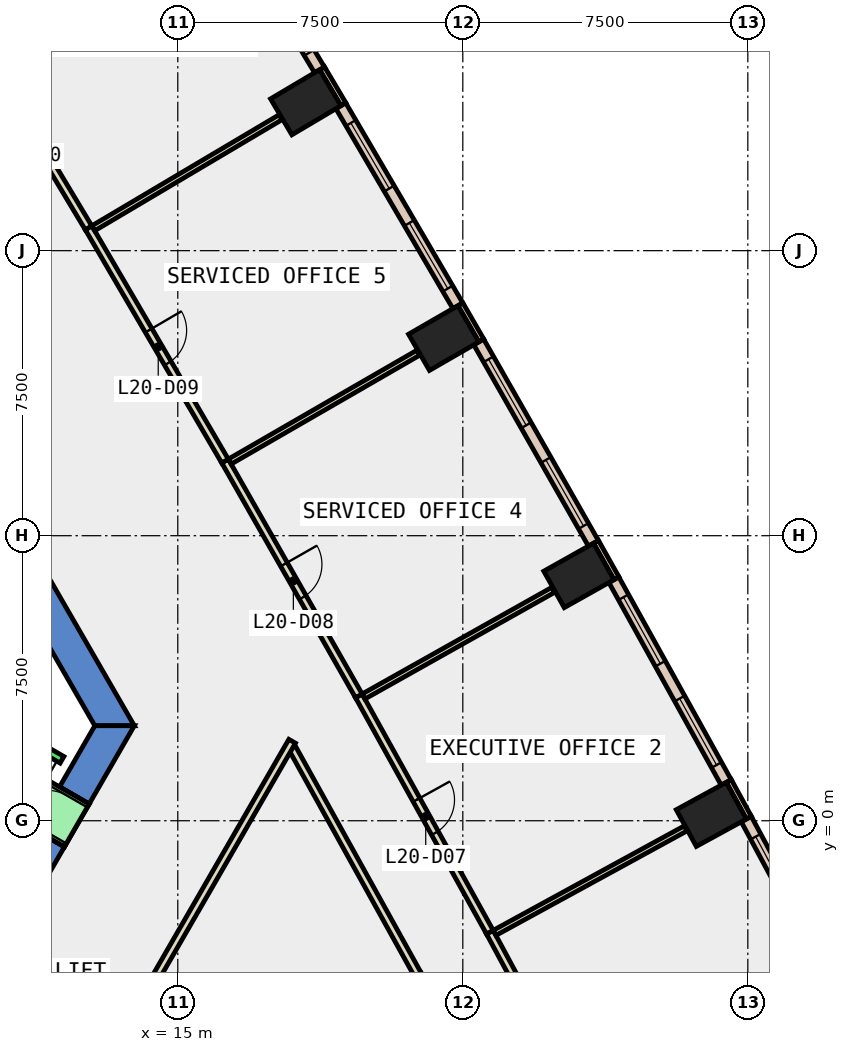
"""IFC4 building model, lengths in metres.
Left out: names, types, materials, properties, quantities, classifications, styles, units other than length and angle.
Written with IfcOpenShell. Run it as: python <this file> out.ifc"""

import sys

from ifc_helpers import new_model, si_unit, direction, frame, frame_2d, origin, origin_2d, place, context, subcontext, project, spatial, polyline, rectangle, outline, extrude, element, fill, save


model = new_model("IFC4")
c1 = context("Model", 3, precision=1e-05, world=origin(), true_north=direction((0.0, 1.0)))
c2 = subcontext(c1, "Body", "Model", "MODEL_VIEW")
j1 = project(units=[si_unit("LENGTHUNIT", "METRE"), si_unit("PLANEANGLEUNIT", "RADIAN")], contexts=[c1])
p1 = place(None, origin())
s1 = spatial("IfcSite", under=j1, at=p1, CompositionType="ELEMENT")
p2 = place(p1, origin())
s2 = spatial("IfcBuilding", under=s1, at=p2, CompositionType="ELEMENT")
p3 = place(p2, frame((0.0, 0.0, 95.0)))
s3 = spatial("IfcBuildingStorey", under=s2, at=p3, CompositionType="ELEMENT", Elevation=95.0)
for number, where, z_axis, x_axis in (
    (1, (29.039, 0.167, -0.4), (0.0, 0.0, 1.0), (-0.48, 0.877, 0.0)),
    (2, (25.554, 6.454, -0.4), (0.0, 0.0, 1.0), (-0.49, 0.872, 0.0)),
    (3, (21.997, 12.7, -0.4), (0.0, 0.0, 1.0), (-0.5, 0.866, 0.0)),
    (4, (18.367, 18.904, -0.4), (0.0, 0.0, 1.0), (-0.51, 0.86, 0.0)),
):
    element("IfcColumn", number, at=place(p3, frame(where, z_axis=z_axis, x_axis=x_axis)), inside=s3, PredefinedType="COLUMN", context=c2, shape_type="SweptSolid", body=[
        extrude(rectangle(XDim=1.1, YDim=1.5, at=origin_2d()), origin(), (0.0, 0.0, 1.0), 4.2),
    ])
p4 = place(p3, frame((0.0, 0.0, -0.4)))
e5 = element("IfcWall", 5, at=p4, inside=s3, PredefinedType="SHEAR", context=c2, shape_type="SweptSolid", body=[
    extrude(outline(polyline([(8.517, 11.748), (7.738, 11.298), (12.817, 2.5), (13.856, 2.5), (8.517, 11.748)])), origin(), (0.0, 0.0, 1.0), 4.2),
])
p5 = place(p3, frame((0.0, 0.0, -0.4)))
e6 = element("IfcWall", 6, at=p5, inside=s3, PredefinedType="SHEAR", context=c2, shape_type="SweptSolid", body=[
    extrude(outline(polyline([(12.017, -0.686), (11.238, -0.236), (10.588, -1.361), (11.367, -1.811), (12.017, -0.686)])), origin(), (0.0, 0.0, 1.0), 4.2),
])
p6 = place(p3, frame((0.0, 0.0, -0.4)))
e7 = element("IfcWall", 7, at=p6, inside=s3, PredefinedType="SHEAR", context=c2, shape_type="SweptSolid", body=[
    extrude(outline(polyline([(11.888, 0.89), (12.667, 0.44), (13.856, 2.5), (12.817, 2.5), (11.888, 0.89)])), origin(), (0.0, 0.0, 1.0), 4.2),
])
p7 = place(p3, frame((0.0, 0.0, 3.6)))
e8 = element("IfcWall", 8, at=p7, inside=s3, PredefinedType="SHEAR", context=c2, shape_type="SweptSolid", body=[
    extrude(outline(polyline([(12.667, 0.44), (11.888, 0.89), (11.238, -0.236), (12.017, -0.686), (12.667, 0.44)])), origin(), (0.0, 0.0, 1.0), 0.2),
])
p8 = place(p3, frame((30.027, 0.08, 0.0), z_axis=(0.0, 0.0, 1.0), x_axis=(-0.479737645119, 0.877411985247, 0.0)))
e9 = element("IfcWall", 9, at=p8, inside=s3, PredefinedType="STANDARD", context=c2, shape_type="SweptSolid", body=[
    extrude(rectangle(XDim=1.101, YDim=0.15, at=frame_2d((0.55, 0.0))), origin(), (0.0, 0.0, 1.0), 3.8),
])
p9 = place(p3, frame((26.543, 6.379, 0.0), z_axis=(0.0, 0.0, 1.0), x_axis=(-0.490008344094, 0.871717742574, 0.0)))
e10 = element("IfcWall", 10, at=p9, inside=s3, PredefinedType="STANDARD", context=c2, shape_type="SweptSolid", body=[
    extrude(rectangle(XDim=1.1, YDim=0.15, at=frame_2d((0.55, 0.0))), origin(), (0.0, 0.0, 1.0), 3.8),
])
p10 = place(p3, frame((22.986, 12.636, 0.0), z_axis=(0.0, 0.0, 1.0), x_axis=(-0.499837685251, 0.86611909597, 0.0)))
e11 = element("IfcWall", 11, at=p10, inside=s3, PredefinedType="STANDARD", context=c2, shape_type="SweptSolid", body=[
    extrude(rectangle(XDim=1.1, YDim=0.15, at=frame_2d((0.55, 0.0))), origin(), (0.0, 0.0, 1.0), 3.8),
])
p11 = place(p3, frame((19.357, 18.852, 0.0), z_axis=(0.0, 0.0, 1.0), x_axis=(-0.510082245696, 0.860125631885, 0.0)))
e12 = element("IfcWall", 12, at=p11, inside=s3, PredefinedType="STANDARD", context=c2, shape_type="SweptSolid", body=[
    extrude(rectangle(XDim=1.1, YDim=0.15, at=frame_2d((0.55, 0.0))), origin(), (0.0, 0.0, 1.0), 3.8),
])
p12 = place(p3, frame((32.851, -5.325, 0.0), z_axis=(0.0, 0.0, 1.0), x_axis=(-0.474369552216, 0.880325807829, 0.0)))
e13 = element("IfcWall", 13, at=p12, inside=s3, PredefinedType="STANDARD", context=c2, shape_type="SweptSolid", body=[
    extrude(rectangle(XDim=6.099, YDim=0.3, at=frame_2d((3.049, 0.0))), origin(), (0.0, 0.0, 1.0), 3.8),
])
p13 = place(p12, frame((0.525, 0.0, 0.9)))
e14 = element("IfcOpeningElement", 14, at=p13, cuts=e13, PredefinedType="OPENING", context=c2, shape_type="SweptSolid", body=[
    extrude(rectangle(XDim=2.0, YDim=2.6, at=frame_2d((1.0, 1.3))), frame((0.0, 0.16, 0.0), z_axis=(0.0, -1.0, 0.0), x_axis=(1.0, 0.0, 0.0)), (0.0, 0.0, 1.0), 0.32),
])
p14 = place(p12, frame((3.574, 0.0, 0.9)))
e15 = element("IfcOpeningElement", 15, at=p14, cuts=e13, PredefinedType="OPENING", context=c2, shape_type="SweptSolid", body=[
    extrude(rectangle(XDim=2.0, YDim=2.6, at=frame_2d((1.0, 1.3))), frame((0.0, 0.16, 0.0), z_axis=(0.0, -1.0, 0.0), x_axis=(1.0, 0.0, 0.0)), (0.0, 0.0, 1.0), 0.32),
])
p15 = place(p3, frame((29.431, 1.007, 0.0), z_axis=(0.0, 0.0, 1.0), x_axis=(-0.484823579315, 0.874611969356, 0.0)))
e16 = element("IfcWall", 16, at=p15, inside=s3, PredefinedType="STANDARD", context=c2, shape_type="SweptSolid", body=[
    extrude(rectangle(XDim=6.099, YDim=0.3, at=frame_2d((3.049, 0.0))), origin(), (0.0, 0.0, 1.0), 3.8),
])
p16 = place(p15, frame((0.525, 0.0, 0.9)))
e17 = element("IfcOpeningElement", 17, at=p16, cuts=e16, PredefinedType="OPENING", context=c2, shape_type="SweptSolid", body=[
    extrude(rectangle(XDim=2.0, YDim=2.6, at=frame_2d((1.0, 1.3))), frame((0.0, 0.16, 0.0), z_axis=(0.0, -1.0, 0.0), x_axis=(1.0, 0.0, 0.0)), (0.0, 0.0, 1.0), 0.32),
])
p17 = place(p15, frame((3.574, 0.0, 0.9)))
e18 = element("IfcOpeningElement", 18, at=p17, cuts=e16, PredefinedType="OPENING", context=c2, shape_type="SweptSolid", body=[
    extrude(rectangle(XDim=2.0, YDim=2.6, at=frame_2d((1.0, 1.3))), frame((0.0, 0.16, 0.0), z_axis=(0.0, -1.0, 0.0), x_axis=(1.0, 0.0, 0.0)), (0.0, 0.0, 1.0), 0.32),
])
p18 = place(p3, frame((25.936, 7.299, 0.0), z_axis=(0.0, 0.0, 1.0), x_axis=(-0.49492259535, 0.868937065967, 0.0)))
e19 = element("IfcWall", 19, at=p18, inside=s3, PredefinedType="STANDARD", context=c2, shape_type="SweptSolid", body=[
    extrude(rectangle(XDim=6.098, YDim=0.3, at=frame_2d((3.049, 0.0))), origin(), (0.0, 0.0, 1.0), 3.8),
])
p19 = place(p18, frame((0.525, 0.0, 0.9)))
e20 = element("IfcOpeningElement", 20, at=p19, cuts=e19, PredefinedType="OPENING", context=c2, shape_type="SweptSolid", body=[
    extrude(rectangle(XDim=2.0, YDim=2.6, at=frame_2d((1.0, 1.3))), frame((0.0, 0.16, 0.0), z_axis=(0.0, -1.0, 0.0), x_axis=(1.0, 0.0, 0.0)), (0.0, 0.0, 1.0), 0.32),
])
p20 = place(p18, frame((3.574, 0.0, 0.9)))
e21 = element("IfcOpeningElement", 21, at=p20, cuts=e19, PredefinedType="OPENING", context=c2, shape_type="SweptSolid", body=[
    extrude(rectangle(XDim=2.0, YDim=2.6, at=frame_2d((1.0, 1.3))), frame((0.0, 0.16, 0.0), z_axis=(0.0, -1.0, 0.0), x_axis=(1.0, 0.0, 0.0)), (0.0, 0.0, 1.0), 0.32),
])
p21 = place(p3, frame((22.369, 13.549, 0.0), z_axis=(0.0, 0.0, 1.0), x_axis=(-0.504998117261, 0.863120444413, 0.0)))
e22 = element("IfcWall", 22, at=p21, inside=s3, PredefinedType="STANDARD", context=c2, shape_type="SweptSolid", body=[
    extrude(rectangle(XDim=6.099, YDim=0.3, at=frame_2d((3.049, 0.0))), origin(), (0.0, 0.0, 1.0), 3.8),
])
p22 = place(p21, frame((0.525, 0.0, 0.9)))
e23 = element("IfcOpeningElement", 23, at=p22, cuts=e22, PredefinedType="OPENING", context=c2, shape_type="SweptSolid", body=[
    extrude(rectangle(XDim=2.0, YDim=2.6, at=frame_2d((1.0, 1.3))), frame((0.0, 0.16, 0.0), z_axis=(0.0, -1.0, 0.0), x_axis=(1.0, 0.0, 0.0)), (0.0, 0.0, 1.0), 0.32),
])
p23 = place(p21, frame((3.574, 0.0, 0.9)))
e24 = element("IfcOpeningElement", 24, at=p23, cuts=e22, PredefinedType="OPENING", context=c2, shape_type="SweptSolid", body=[
    extrude(rectangle(XDim=2.0, YDim=2.6, at=frame_2d((1.0, 1.3))), frame((0.0, 0.16, 0.0), z_axis=(0.0, -1.0, 0.0), x_axis=(1.0, 0.0, 0.0)), (0.0, 0.0, 1.0), 0.32),
])
p24 = place(p3, frame((18.729, 19.757, 0.0), z_axis=(0.0, 0.0, 1.0), x_axis=(-0.515102053092, 0.857128855483, 0.0)))
e25 = element("IfcWall", 25, at=p24, inside=s3, PredefinedType="STANDARD", context=c2, shape_type="SweptSolid", body=[
    extrude(rectangle(XDim=6.098, YDim=0.3, at=frame_2d((3.049, 0.0))), origin(), (0.0, 0.0, 1.0), 3.8),
])
p25 = place(p24, frame((0.525, 0.0, 0.9)))
e26 = element("IfcOpeningElement", 26, at=p25, cuts=e25, PredefinedType="OPENING", context=c2, shape_type="SweptSolid", body=[
    extrude(rectangle(XDim=2.0, YDim=2.6, at=frame_2d((1.0, 1.3))), frame((0.0, 0.16, 0.0), z_axis=(0.0, -1.0, 0.0), x_axis=(1.0, 0.0, 0.0)), (0.0, 0.0, 1.0), 0.32),
])
p26 = place(p24, frame((3.574, 0.0, 0.9)))
e27 = element("IfcOpeningElement", 27, at=p26, cuts=e25, PredefinedType="OPENING", context=c2, shape_type="SweptSolid", body=[
    extrude(rectangle(XDim=2.0, YDim=2.6, at=frame_2d((1.0, 1.3))), frame((0.0, 0.16, 0.0), z_axis=(0.0, -1.0, 0.0), x_axis=(1.0, 0.0, 0.0)), (0.0, 0.0, 1.0), 0.32),
])
p27 = place(p3, frame((21.317, -4.053, 0.0), z_axis=(0.0, 0.0, 1.0), x_axis=(-0.484816829319, 0.874615711046, 0.0)))
e28 = element("IfcWall", 28, at=p27, inside=s3, PredefinedType="PARTITIONING", context=c2, shape_type="SweptSolid", body=[
    extrude(rectangle(XDim=6.827, YDim=0.2, at=frame_2d((3.414, 0.0))), origin(), (0.0, 0.0, 1.0), 3.8),
])
p28 = place(p3, frame((23.212, -2.932, 0.0), z_axis=(0.0, 0.0, 1.0), x_axis=(0.474404892994, -0.880306763295, 0.0)))
e29 = element("IfcWall", 29, at=p28, inside=s3, PredefinedType="PARTITIONING", context=c2, shape_type="SweptSolid", body=[
    extrude(rectangle(XDim=7.11, YDim=0.2, at=frame_2d((3.555, 0.0))), origin(), (0.0, 0.0, 1.0), 3.8),
])
p29 = place(p28, frame((3.13, 0.0, 0.0)))
e30 = element("IfcOpeningElement", 30, at=p29, cuts=e29, PredefinedType="OPENING", context=c2, shape_type="SweptSolid", body=[
    extrude(rectangle(XDim=1.0, YDim=2.1, at=frame_2d((0.5, 1.05))), frame((0.0, 0.11, 0.0), z_axis=(0.0, -1.0, 0.0), x_axis=(1.0, 0.0, 0.0)), (0.0, 0.0, 1.0), 0.22),
])
p30 = place(p3, frame((19.764, 3.286, 0.0), z_axis=(0.0, 0.0, 1.0), x_axis=(0.484858403734, -0.874592664232, 0.0)))
e31 = element("IfcWall", 31, at=p30, inside=s3, PredefinedType="PARTITIONING", context=c2, shape_type="SweptSolid", body=[
    extrude(rectangle(XDim=7.109, YDim=0.2, at=frame_2d((3.555, 0.0))), origin(), (0.0, 0.0, 1.0), 3.8),
])
p31 = place(p30, frame((3.13, 0.0, 0.0)))
e32 = element("IfcOpeningElement", 32, at=p31, cuts=e31, PredefinedType="OPENING", context=c2, shape_type="SweptSolid", body=[
    extrude(rectangle(XDim=1.0, YDim=2.1, at=frame_2d((0.5, 1.05))), frame((0.0, 0.11, 0.0), z_axis=(0.0, -1.0, 0.0), x_axis=(1.0, 0.0, 0.0)), (0.0, 0.0, 1.0), 0.22),
])
p32 = place(p3, frame((16.243, 9.465, 0.0), z_axis=(0.0, 0.0, 1.0), x_axis=(0.495081262009, -0.868846674625, 0.0)))
e33 = element("IfcWall", 33, at=p32, inside=s3, PredefinedType="PARTITIONING", context=c2, shape_type="SweptSolid", body=[
    extrude(rectangle(XDim=7.112, YDim=0.2, at=frame_2d((3.556, 0.0))), origin(), (0.0, 0.0, 1.0), 3.8),
])
p33 = place(p32, frame((3.131, 0.0, 0.0)))
e34 = element("IfcOpeningElement", 34, at=p33, cuts=e33, PredefinedType="OPENING", context=c2, shape_type="SweptSolid", body=[
    extrude(rectangle(XDim=1.0, YDim=2.1, at=frame_2d((0.5, 1.05))), frame((0.0, 0.11, 0.0), z_axis=(0.0, -1.0, 0.0), x_axis=(1.0, 0.0, 0.0)), (0.0, 0.0, 1.0), 0.22),
])
p34 = place(p3, frame((12.652, 15.602, 0.0), z_axis=(0.0, 0.0, 1.0), x_axis=(0.504914693075, -0.863169249172, 0.0)))
e35 = element("IfcWall", 35, at=p34, inside=s3, PredefinedType="PARTITIONING", context=c2, shape_type="SweptSolid", body=[
    extrude(rectangle(XDim=7.11, YDim=0.2, at=frame_2d((3.555, 0.0))), origin(), (0.0, 0.0, 1.0), 3.8),
])
p35 = place(p34, frame((3.13, 0.0, 0.0)))
e36 = element("IfcOpeningElement", 36, at=p35, cuts=e35, PredefinedType="OPENING", context=c2, shape_type="SweptSolid", body=[
    extrude(rectangle(XDim=1.0, YDim=2.1, at=frame_2d((0.5, 1.05))), frame((0.0, 0.11, 0.0), z_axis=(0.0, -1.0, 0.0), x_axis=(1.0, 0.0, 0.0)), (0.0, 0.0, 1.0), 0.22),
])
p36 = place(p3, frame((8.989, 21.696, 0.0), z_axis=(0.0, 0.0, 1.0), x_axis=(0.515000602442, -0.857189815318, 0.0)))
e37 = element("IfcWall", 37, at=p36, inside=s3, PredefinedType="PARTITIONING", context=c2, shape_type="SweptSolid", body=[
    extrude(rectangle(XDim=7.11, YDim=0.2, at=frame_2d((3.555, 0.0))), origin(), (0.0, 0.0, 1.0), 3.8),
])
p37 = place(p36, frame((3.13, 0.0, 0.0)))
e38 = element("IfcOpeningElement", 38, at=p37, cuts=e37, PredefinedType="OPENING", context=c2, shape_type="SweptSolid", body=[
    extrude(rectangle(XDim=1.0, YDim=2.1, at=frame_2d((0.5, 1.05))), frame((0.0, 0.11, 0.0), z_axis=(0.0, -1.0, 0.0), x_axis=(1.0, 0.0, 0.0)), (0.0, 0.0, 1.0), 0.22),
])
p38 = place(p3, frame((18.009, 2.092, 0.0), z_axis=(0.0, 0.0, 1.0), x_axis=(-0.499980796252, -0.866036490789, 0.0)))
e39 = element("IfcWall", 39, at=p38, inside=s3, PredefinedType="PARTITIONING", context=c2, shape_type="SweptSolid", body=[
    extrude(rectangle(XDim=10.417, YDim=0.2, at=frame_2d((5.208, 0.0))), origin(), (0.0, 0.0, 1.0), 3.8),
])
p39 = place(p3, frame((23.336, -2.95, 0.0), z_axis=(0.0, 0.0, 1.0), x_axis=(0.877455496162, 0.479658057637, 0.0)))
e40 = element("IfcWall", 40, at=p39, inside=s3, PredefinedType="PARTITIONING", context=c2, shape_type="SweptSolid", body=[
    extrude(rectangle(XDim=5.729, YDim=0.15, at=frame_2d((2.865, 0.0))), origin(), (0.0, 0.0, 1.0), 3.8),
])
p40 = place(p3, frame((19.888, 3.27, 0.0), z_axis=(0.0, 0.0, 1.0), x_axis=(0.871789386467, 0.489880868828, 0.0)))
e41 = element("IfcWall", 41, at=p40, inside=s3, PredefinedType="PARTITIONING", context=c2, shape_type="SweptSolid", body=[
    extrude(rectangle(XDim=5.73, YDim=0.15, at=frame_2d((2.865, 0.0))), origin(), (0.0, 0.0, 1.0), 3.8),
])
p41 = place(p3, frame((16.367, 9.45, 0.0), z_axis=(0.0, 0.0, 1.0), x_axis=(0.866061440635, 0.499937577149, 0.0)))
e42 = element("IfcWall", 42, at=p41, inside=s3, PredefinedType="PARTITIONING", context=c2, shape_type="SweptSolid", body=[
    extrude(rectangle(XDim=5.731, YDim=0.15, at=frame_2d((2.865, 0.0))), origin(), (0.0, 0.0, 1.0), 3.8),
])
p42 = place(p3, frame((12.776, 15.589, 0.0), z_axis=(0.0, 0.0, 1.0), x_axis=(0.860225086153, 0.509914503768, 0.0)))
e43 = element("IfcWall", 43, at=p42, inside=s3, PredefinedType="PARTITIONING", context=c2, shape_type="SweptSolid", body=[
    extrude(rectangle(XDim=5.73, YDim=0.15, at=frame_2d((2.865, 0.0))), origin(), (0.0, 0.0, 1.0), 3.8),
])
p43 = place(p3, frame((9.788, 2.853, 0.0), z_axis=(0.0, 0.0, 1.0), x_axis=(0.865998541277, -0.500046524342, 0.0)))
e44 = element("IfcWall", 44, at=p43, inside=s3, PredefinedType="STANDARD", context=c2, shape_type="SweptSolid", body=[
    extrude(rectangle(XDim=2.5, YDim=0.2, at=frame_2d((1.25, 0.0))), origin(), (0.0, 0.0, 1.0), 3.8),
])
p44 = place(p3, frame((11.498, -0.385, 0.0), z_axis=(0.0, 0.0, 1.0), x_axis=(0.500221244143, 0.865897630733, 0.0)))
e45 = element("IfcWall", 45, at=p44, inside=s3, PredefinedType="STANDARD", context=c2, shape_type="SweptSolid", body=[
    extrude(rectangle(XDim=1.299, YDim=1.2, at=frame_2d((0.65, 0.0))), origin(), (0.0, 0.0, 1.0), 2.4),
])
p45 = place(p44, frame((0.1, 0.0, 0.0)))
e46 = element("IfcOpeningElement", 46, at=p45, cuts=e45, PredefinedType="OPENING", context=c2, shape_type="SweptSolid", body=[
    extrude(rectangle(XDim=1.1, YDim=2.3, at=frame_2d((0.55, 1.15))), frame((0.0, 0.61, 0.0), z_axis=(0.0, -1.0, 0.0), x_axis=(1.0, 0.0, 0.0)), (0.0, 0.0, 1.0), 1.22),
])
p46 = place(p14, origin())
e47 = element("IfcWindow", 47, at=p46, inside=s3, PartitioningType="SINGLE_PANEL", PredefinedType="WINDOW", context=c2, shape_type="SweptSolid", body=[
    extrude(rectangle(XDim=2.0, YDim=2.6, at=frame_2d((1.0, 1.3))), frame((0.0, 0.03, 0.0), z_axis=(0.0, -1.0, 0.0), x_axis=(1.0, 0.0, 0.0)), (0.0, 0.0, 1.0), 0.06),
])
fill(e15, e47)
p47 = place(p16, origin())
e48 = element("IfcWindow", 48, at=p47, inside=s3, PartitioningType="SINGLE_PANEL", PredefinedType="WINDOW", context=c2, shape_type="SweptSolid", body=[
    extrude(rectangle(XDim=2.0, YDim=2.6, at=frame_2d((1.0, 1.3))), frame((0.0, 0.03, 0.0), z_axis=(0.0, -1.0, 0.0), x_axis=(1.0, 0.0, 0.0)), (0.0, 0.0, 1.0), 0.06),
])
fill(e17, e48)
p48 = place(p17, origin())
e49 = element("IfcWindow", 49, at=p48, inside=s3, PartitioningType="SINGLE_PANEL", PredefinedType="WINDOW", context=c2, shape_type="SweptSolid", body=[
    extrude(rectangle(XDim=2.0, YDim=2.6, at=frame_2d((1.0, 1.3))), frame((0.0, 0.03, 0.0), z_axis=(0.0, -1.0, 0.0), x_axis=(1.0, 0.0, 0.0)), (0.0, 0.0, 1.0), 0.06),
])
fill(e18, e49)
p49 = place(p19, origin())
e50 = element("IfcWindow", 50, at=p49, inside=s3, PartitioningType="SINGLE_PANEL", PredefinedType="WINDOW", context=c2, shape_type="SweptSolid", body=[
    extrude(rectangle(XDim=2.0, YDim=2.6, at=frame_2d((1.0, 1.3))), frame((0.0, 0.03, 0.0), z_axis=(0.0, -1.0, 0.0), x_axis=(1.0, 0.0, 0.0)), (0.0, 0.0, 1.0), 0.06),
])
fill(e20, e50)
p50 = place(p20, origin())
e51 = element("IfcWindow", 51, at=p50, inside=s3, PartitioningType="SINGLE_PANEL", PredefinedType="WINDOW", context=c2, shape_type="SweptSolid", body=[
    extrude(rectangle(XDim=2.0, YDim=2.6, at=frame_2d((1.0, 1.3))), frame((0.0, 0.03, 0.0), z_axis=(0.0, -1.0, 0.0), x_axis=(1.0, 0.0, 0.0)), (0.0, 0.0, 1.0), 0.06),
])
fill(e21, e51)
p51 = place(p22, origin())
e52 = element("IfcWindow", 52, at=p51, inside=s3, PartitioningType="SINGLE_PANEL", PredefinedType="WINDOW", context=c2, shape_type="SweptSolid", body=[
    extrude(rectangle(XDim=2.0, YDim=2.6, at=frame_2d((1.0, 1.3))), frame((0.0, 0.03, 0.0), z_axis=(0.0, -1.0, 0.0), x_axis=(1.0, 0.0, 0.0)), (0.0, 0.0, 1.0), 0.06),
])
fill(e23, e52)
p52 = place(p23, origin())
e53 = element("IfcWindow", 53, at=p52, inside=s3, PartitioningType="SINGLE_PANEL", PredefinedType="WINDOW", context=c2, shape_type="SweptSolid", body=[
    extrude(rectangle(XDim=2.0, YDim=2.6, at=frame_2d((1.0, 1.3))), frame((0.0, 0.03, 0.0), z_axis=(0.0, -1.0, 0.0), x_axis=(1.0, 0.0, 0.0)), (0.0, 0.0, 1.0), 0.06),
])
fill(e24, e53)
p53 = place(p25, origin())
e54 = element("IfcWindow", 54, at=p53, inside=s3, PartitioningType="SINGLE_PANEL", PredefinedType="WINDOW", context=c2, shape_type="SweptSolid", body=[
    extrude(rectangle(XDim=2.0, YDim=2.6, at=frame_2d((1.0, 1.3))), frame((0.0, 0.03, 0.0), z_axis=(0.0, -1.0, 0.0), x_axis=(1.0, 0.0, 0.0)), (0.0, 0.0, 1.0), 0.06),
])
fill(e26, e54)
p54 = place(p31, origin())
e55 = element("IfcDoor", 55, at=p54, inside=s3, OperationType="SINGLE_SWING_LEFT", PredefinedType="DOOR", context=c2, shape_type="SweptSolid", body=[
    extrude(rectangle(XDim=1.0, YDim=2.1, at=frame_2d((0.5, 1.05))), frame((0.0, 0.025, 0.0), z_axis=(0.0, -1.0, 0.0), x_axis=(1.0, 0.0, 0.0)), (0.0, 0.0, 1.0), 0.05),
])
fill(e32, e55)
p55 = place(p33, origin())
e56 = element("IfcDoor", 56, at=p55, inside=s3, OperationType="SINGLE_SWING_LEFT", PredefinedType="DOOR", context=c2, shape_type="SweptSolid", body=[
    extrude(rectangle(XDim=1.0, YDim=2.1, at=frame_2d((0.5, 1.05))), frame((0.0, 0.025, 0.0), z_axis=(0.0, -1.0, 0.0), x_axis=(1.0, 0.0, 0.0)), (0.0, 0.0, 1.0), 0.05),
])
fill(e34, e56)
p56 = place(p35, origin())
e57 = element("IfcDoor", 57, at=p56, inside=s3, OperationType="SINGLE_SWING_LEFT", PredefinedType="DOOR", context=c2, shape_type="SweptSolid", body=[
    extrude(rectangle(XDim=1.0, YDim=2.1, at=frame_2d((0.5, 1.05))), frame((0.0, 0.025, 0.0), z_axis=(0.0, -1.0, 0.0), x_axis=(1.0, 0.0, 0.0)), (0.0, 0.0, 1.0), 0.05),
])
fill(e36, e57)
p57 = place(p45, origin())
e58 = element("IfcDoor", 58, at=p57, inside=s3, OperationType="SLIDING_TO_LEFT", PredefinedType="DOOR", context=c2, shape_type="SweptSolid", body=[
    extrude(rectangle(XDim=1.1, YDim=2.3, at=frame_2d((0.55, 1.15))), frame((0.0, 0.025, 0.0), z_axis=(0.0, -1.0, 0.0), x_axis=(1.0, 0.0, 0.0)), (0.0, 0.0, 1.0), 0.05),
])
fill(e46, e58)
save(model, sys.argv[1])
